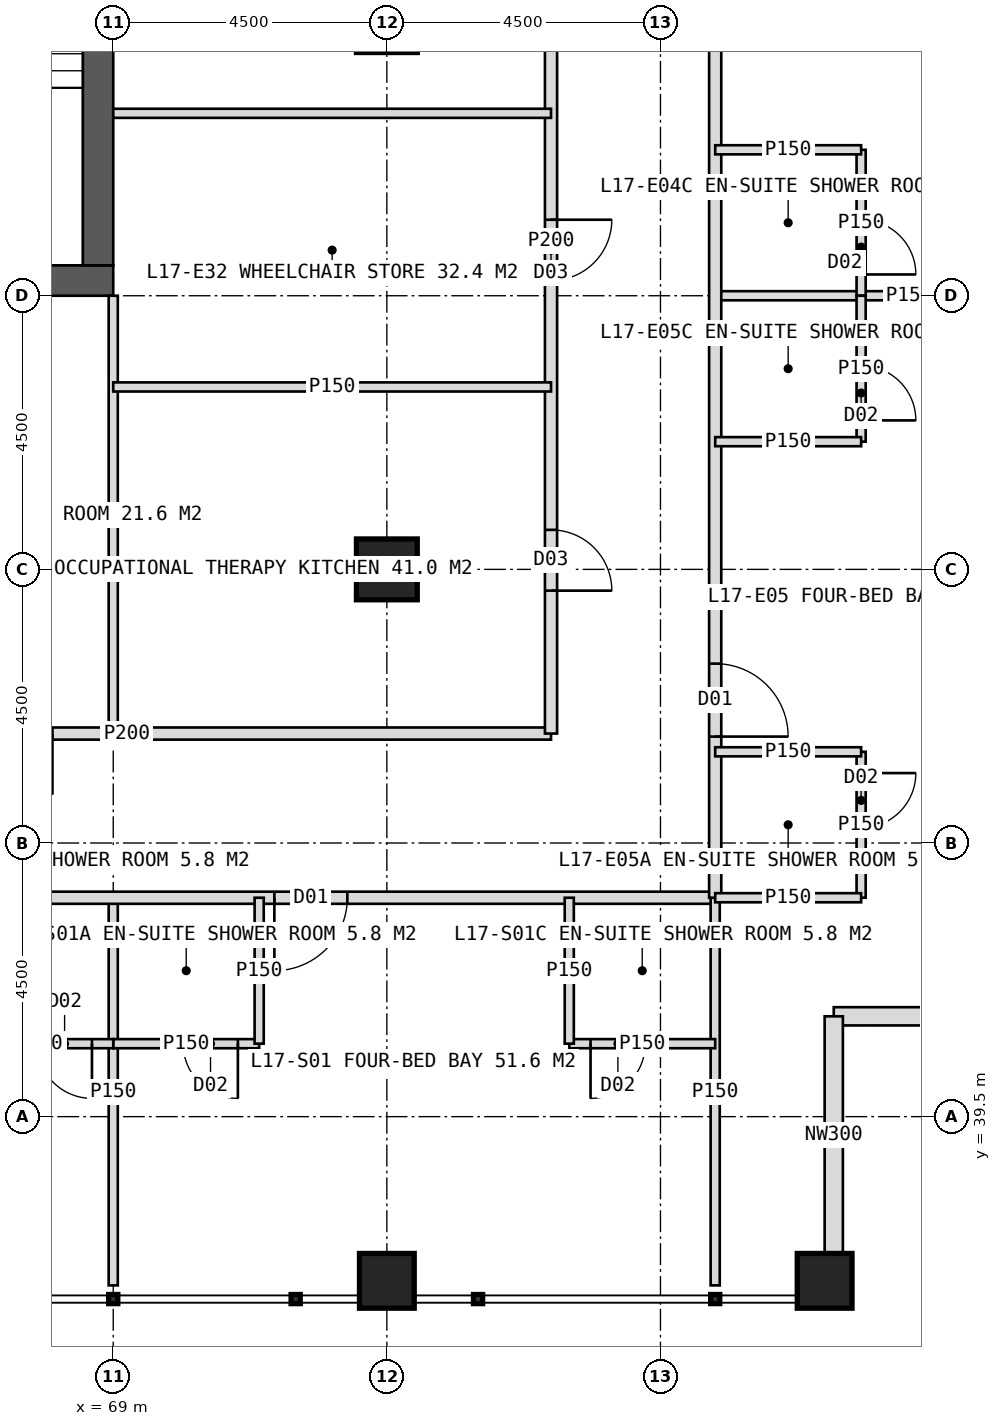
"""IFC4 building model, lengths in metres.
Left out: names, types, materials, properties, quantities, classifications, styles, units other than length and angle.
Written with IfcOpenShell. Run it as: python <this file> out.ifc"""

import sys

from ifc_helpers import new_model, si_unit, direction, frame, frame_2d, origin, origin_2d, place, context, subcontext, project, spatial, rectangle, hollow_rectangle, extrude, element, fill, save


model = new_model("IFC4")
c1 = context("Model", 3, precision=1e-05, world=origin(), true_north=direction((0.0, 1.0)))
c2 = subcontext(c1, "Body", "Model", "MODEL_VIEW")
j1 = project(units=[si_unit("LENGTHUNIT", "METRE"), si_unit("PLANEANGLEUNIT", "RADIAN")], contexts=[c1])
p1 = place(None, origin())
s1 = spatial("IfcSite", under=j1, at=p1, CompositionType="ELEMENT")
p2 = place(p1, origin())
s2 = spatial("IfcBuilding", under=s1, at=p2, CompositionType="ELEMENT")
p3 = place(p2, frame((0.0, 0.0, 75.0)))
s3 = spatial("IfcBuildingStorey", under=s2, at=p3, CompositionType="ELEMENT", Elevation=75.0)
p4 = place(p3, frame((51.0, 53.25, 0.0), z_axis=(0.0, 0.0, 1.0), x_axis=(1.0, 0.0, 0.0)))
e1 = element("IfcWall", 1, at=p4, inside=s3, PredefinedType="SHEAR", context=c2, shape_type="SweptSolid", body=[
    extrude(rectangle(XDim=18.0, YDim=0.5, at=frame_2d((9.0, 0.0))), origin(), (0.0, 0.0, 1.0), 4.0),
])
p5 = place(p4, frame((8.1, 0.0, 0.0)))
e2 = element("IfcOpeningElement", 2, at=p5, cuts=e1, PredefinedType="OPENING", context=c2, shape_type="SweptSolid", body=[
    extrude(rectangle(XDim=1.8, YDim=2.2, at=frame_2d((0.9, 1.1))), frame((0.0, 0.26, 0.0), z_axis=(0.0, -1.0, 0.0), x_axis=(1.0, 0.0, 0.0)), (0.0, 0.0, 1.0), 0.52),
])
p6 = place(p3, frame((68.75, 53.5, 0.0), z_axis=(0.0, 0.0, 1.0), x_axis=(0.0, 1.0, 0.0)))
e3 = element("IfcWall", 3, at=p6, inside=s3, PredefinedType="SHEAR", context=c2, shape_type="SweptSolid", body=[
    extrude(rectangle(XDim=17.0, YDim=0.5, at=frame_2d((8.5, 0.0))), origin(), (0.0, 0.0, 1.0), 4.0),
])
p7 = place(p6, frame((9.5, 0.0, 0.0)))
e4 = element("IfcOpeningElement", 4, at=p7, cuts=e3, PredefinedType="OPENING", context=c2, shape_type="SweptSolid", body=[
    extrude(rectangle(XDim=1.5, YDim=2.2, at=frame_2d((0.75, 1.1))), frame((0.0, 0.26, 0.0), z_axis=(0.0, -1.0, 0.0), x_axis=(1.0, 0.0, 0.0)), (0.0, 0.0, 1.0), 0.52),
])
p8 = place(p3, frame((73.5, 48.5, 0.0), z_axis=(0.0, 0.0, 1.0), x_axis=(1.0, 0.0, 0.0)))
e5 = element("IfcColumn", 5, at=p8, inside=s3, PredefinedType="COLUMN", context=c2, shape_type="SweptSolid", body=[
    extrude(hollow_rectangle(XDim=1.0, YDim=1.0, WallThickness=0.1, at=origin_2d()), origin(), (0.0, 0.0, 1.0), 4.0),
])
for number, where, z_axis, x_axis in (
    (6, (73.5, 36.8, 0.0), (0.0, 0.0, 1.0), (1.0, 0.0, 0.0)),
    (7, (80.7, 36.8, 0.0), (0.0, 0.0, 1.0), (1.0, 0.0, 0.0)),
):
    element("IfcColumn", number, at=place(p3, frame(where, z_axis=z_axis, x_axis=x_axis)), inside=s3, PredefinedType="COLUMN", context=c2, shape_type="SweptSolid", body=[
        extrude(hollow_rectangle(XDim=0.9, YDim=0.9, WallThickness=0.08, at=origin_2d()), origin(), (0.0, 0.0, 1.0), 4.0),
    ])
for number, where, z_axis, x_axis in (
    (8, (84.75, 41.15, 0.0), (0.0, 0.0, 1.0), (-1.0, 0.0, 0.0)),
    (9, (80.85, 41.15, 0.0), (0.0, 0.0, 1.0), (0.0, -1.0, 0.0)),
):
    element("IfcWall", number, at=place(p3, frame(where, z_axis=z_axis, x_axis=x_axis)), inside=s3, PredefinedType="ELEMENTEDWALL", context=c2, shape_type="SweptSolid", body=[
        extrude(rectangle(XDim=3.9, YDim=0.3, at=frame_2d((1.95, 0.0))), origin(), (0.0, 0.0, 1.0), 2.95),
    ])
p9 = place(p3, frame((69.0, 43.1, 0.0), z_axis=(0.0, 0.0, 1.0), x_axis=(0.0, -1.0, 0.0)))
e10 = element("IfcWall", 10, at=p9, inside=s3, PredefinedType="PARTITIONING", context=c2, shape_type="SweptSolid", body=[
    extrude(rectangle(XDim=6.375, YDim=0.15, at=frame_2d((3.188, 0.0))), origin(), (0.0, 0.0, 1.0), 3.75),
])
p10 = place(p3, frame((78.9, 43.1, 0.0), z_axis=(0.0, 0.0, 1.0), x_axis=(-1.0, 0.0, 0.0)))
e11 = element("IfcWall", 11, at=p10, inside=s3, PredefinedType="PARTITIONING", context=c2, shape_type="SweptSolid", body=[
    extrude(rectangle(XDim=37.8, YDim=0.2, at=frame_2d((18.9, 0.0))), origin(), (0.0, 0.0, 1.0), 3.75),
])
p11 = place(p10, frame((6.05, 0.0, 0.0)))
e12 = element("IfcOpeningElement", 12, at=p11, cuts=e11, PredefinedType="OPENING", context=c2, shape_type="SweptSolid", body=[
    extrude(rectangle(XDim=1.2, YDim=2.2, at=frame_2d((0.6, 1.1))), frame((0.0, 0.11, 0.0), z_axis=(0.0, -1.0, 0.0), x_axis=(1.0, 0.0, 0.0)), (0.0, 0.0, 1.0), 0.22),
])
p12 = place(p10, frame((12.55, 0.0, 0.0)))
e13 = element("IfcOpeningElement", 13, at=p12, cuts=e11, PredefinedType="OPENING", context=c2, shape_type="SweptSolid", body=[
    extrude(rectangle(XDim=1.2, YDim=2.2, at=frame_2d((0.6, 1.1))), frame((0.0, 0.11, 0.0), z_axis=(0.0, -1.0, 0.0), x_axis=(1.0, 0.0, 0.0)), (0.0, 0.0, 1.0), 0.22),
])
p13 = place(p10, frame((21.05, 0.0, 0.0)))
e14 = element("IfcOpeningElement", 14, at=p13, cuts=e11, PredefinedType="OPENING", context=c2, shape_type="SweptSolid", body=[
    extrude(rectangle(XDim=1.2, YDim=2.2, at=frame_2d((0.6, 1.1))), frame((0.0, 0.11, 0.0), z_axis=(0.0, -1.0, 0.0), x_axis=(1.0, 0.0, 0.0)), (0.0, 0.0, 1.0), 0.22),
])
p14 = place(p10, frame((27.55, 0.0, 0.0)))
e15 = element("IfcOpeningElement", 15, at=p14, cuts=e11, PredefinedType="OPENING", context=c2, shape_type="SweptSolid", body=[
    extrude(rectangle(XDim=1.2, YDim=2.2, at=frame_2d((0.6, 1.1))), frame((0.0, 0.11, 0.0), z_axis=(0.0, -1.0, 0.0), x_axis=(1.0, 0.0, 0.0)), (0.0, 0.0, 1.0), 0.22),
])
p15 = place(p3, frame((78.9, 43.1, 0.0), z_axis=(0.0, 0.0, 1.0), x_axis=(0.0, -1.0, 0.0)))
e16 = element("IfcWall", 16, at=p15, inside=s3, PredefinedType="PARTITIONING", context=c2, shape_type="SweptSolid", body=[
    extrude(rectangle(XDim=6.375, YDim=0.15, at=frame_2d((3.188, 0.0))), origin(), (0.0, 0.0, 1.0), 3.75),
])
p16 = place(p3, frame((71.4, 40.7, 0.0), z_axis=(0.0, 0.0, 1.0), x_axis=(-1.0, 0.0, 0.0)))
e17 = element("IfcWall", 17, at=p16, inside=s3, PredefinedType="PARTITIONING", context=c2, shape_type="SweptSolid", body=[
    extrude(rectangle(XDim=2.4, YDim=0.15, at=frame_2d((1.2, 0.0))), origin(), (0.0, 0.0, 1.0), 3.75),
])
p17 = place(p16, frame((0.35, 0.0, 0.0)))
e18 = element("IfcOpeningElement", 18, at=p17, cuts=e17, PredefinedType="OPENING", context=c2, shape_type="SweptSolid", body=[
    extrude(rectangle(XDim=0.9, YDim=2.1, at=frame_2d((0.45, 1.05))), frame((0.0, 0.085, 0.0), z_axis=(0.0, -1.0, 0.0), x_axis=(1.0, 0.0, 0.0)), (0.0, 0.0, 1.0), 0.17),
])
p18 = place(p3, frame((71.4, 43.1, 0.0), z_axis=(0.0, 0.0, 1.0), x_axis=(0.0, -1.0, 0.0)))
e19 = element("IfcWall", 19, at=p18, inside=s3, PredefinedType="PARTITIONING", context=c2, shape_type="SweptSolid", body=[
    extrude(rectangle(XDim=2.4, YDim=0.15, at=frame_2d((1.2, 0.0))), origin(), (0.0, 0.0, 1.0), 3.75),
])
p19 = place(p3, frame((78.9, 40.7, 0.0), z_axis=(0.0, 0.0, 1.0), x_axis=(-1.0, 0.0, 0.0)))
e20 = element("IfcWall", 20, at=p19, inside=s3, PredefinedType="PARTITIONING", context=c2, shape_type="SweptSolid", body=[
    extrude(rectangle(XDim=2.4, YDim=0.15, at=frame_2d((1.2, 0.0))), origin(), (0.0, 0.0, 1.0), 3.75),
])
p20 = place(p19, frame((1.15, 0.0, 0.0)))
e21 = element("IfcOpeningElement", 21, at=p20, cuts=e20, PredefinedType="OPENING", context=c2, shape_type="SweptSolid", body=[
    extrude(rectangle(XDim=0.9, YDim=2.1, at=frame_2d((0.45, 1.05))), frame((0.0, 0.085, 0.0), z_axis=(0.0, -1.0, 0.0), x_axis=(1.0, 0.0, 0.0)), (0.0, 0.0, 1.0), 0.17),
])
p21 = place(p3, frame((76.5, 43.1, 0.0), z_axis=(0.0, 0.0, 1.0), x_axis=(0.0, -1.0, 0.0)))
e22 = element("IfcWall", 22, at=p21, inside=s3, PredefinedType="PARTITIONING", context=c2, shape_type="SweptSolid", body=[
    extrude(rectangle(XDim=2.4, YDim=0.15, at=frame_2d((1.2, 0.0))), origin(), (0.0, 0.0, 1.0), 3.75),
])
p22 = place(p3, frame((69.0, 40.7, 0.0), z_axis=(0.0, 0.0, 1.0), x_axis=(-1.0, 0.0, 0.0)))
e23 = element("IfcWall", 23, at=p22, inside=s3, PredefinedType="PARTITIONING", context=c2, shape_type="SweptSolid", body=[
    extrude(rectangle(XDim=2.4, YDim=0.15, at=frame_2d((1.2, 0.0))), origin(), (0.0, 0.0, 1.0), 3.75),
])
p23 = place(p22, frame((0.35, 0.0, 0.0)))
e24 = element("IfcOpeningElement", 24, at=p23, cuts=e23, PredefinedType="OPENING", context=c2, shape_type="SweptSolid", body=[
    extrude(rectangle(XDim=0.9, YDim=2.1, at=frame_2d((0.45, 1.05))), frame((0.0, 0.085, 0.0), z_axis=(0.0, -1.0, 0.0), x_axis=(1.0, 0.0, 0.0)), (0.0, 0.0, 1.0), 0.17),
])
p24 = place(p3, frame((69.0, 53.0, 0.0), z_axis=(0.0, 0.0, 1.0), x_axis=(0.0, -1.0, 0.0)))
e25 = element("IfcWall", 25, at=p24, inside=s3, PredefinedType="PARTITIONING", context=c2, shape_type="SweptSolid", body=[
    extrude(rectangle(XDim=7.2, YDim=0.15, at=frame_2d((3.6, 0.0))), origin(), (0.0, 0.0, 1.0), 3.75),
])
p25 = place(p3, frame((76.2, 45.8, 0.0), z_axis=(0.0, 0.0, 1.0), x_axis=(-1.0, 0.0, 0.0)))
e26 = element("IfcWall", 26, at=p25, inside=s3, PredefinedType="PARTITIONING", context=c2, shape_type="SweptSolid", body=[
    extrude(rectangle(XDim=13.95, YDim=0.2, at=frame_2d((6.975, 0.0))), origin(), (0.0, 0.0, 1.0), 3.75),
])
p26 = place(p25, frame((8.2, 0.0, 0.0)))
e27 = element("IfcOpeningElement", 27, at=p26, cuts=e26, PredefinedType="OPENING", context=c2, shape_type="SweptSolid", body=[
    extrude(rectangle(XDim=1.0, YDim=2.1, at=frame_2d((0.5, 1.05))), frame((0.0, 0.11, 0.0), z_axis=(0.0, -1.0, 0.0), x_axis=(1.0, 0.0, 0.0)), (0.0, 0.0, 1.0), 0.22),
])
p27 = place(p25, frame((11.575, 0.0, 0.0)))
e28 = element("IfcOpeningElement", 28, at=p27, cuts=e26, PredefinedType="OPENING", context=c2, shape_type="SweptSolid", body=[
    extrude(rectangle(XDim=1.0, YDim=2.1, at=frame_2d((0.5, 1.05))), frame((0.0, 0.11, 0.0), z_axis=(0.0, -1.0, 0.0), x_axis=(1.0, 0.0, 0.0)), (0.0, 0.0, 1.0), 0.22),
])
p28 = place(p3, frame((78.9, 53.0, 0.0), z_axis=(0.0, 0.0, 1.0), x_axis=(1.0, 0.0, 0.0)))
e29 = element("IfcWall", 29, at=p28, inside=s3, PredefinedType="PARTITIONING", context=c2, shape_type="SweptSolid", body=[
    extrude(rectangle(XDim=6.375, YDim=0.15, at=frame_2d((3.188, 0.0))), origin(), (0.0, 0.0, 1.0), 3.75),
])
p29 = place(p3, frame((78.9, 80.9, 0.0), z_axis=(0.0, 0.0, 1.0), x_axis=(0.0, -1.0, 0.0)))
e30 = element("IfcWall", 30, at=p29, inside=s3, PredefinedType="PARTITIONING", context=c2, shape_type="SweptSolid", body=[
    extrude(rectangle(XDim=37.8, YDim=0.2, at=frame_2d((18.9, 0.0))), origin(), (0.0, 0.0, 1.0), 3.75),
])
p30 = place(p29, frame((2.45, 0.0, 0.0)))
e31 = element("IfcOpeningElement", 31, at=p30, cuts=e30, PredefinedType="OPENING", context=c2, shape_type="SweptSolid", body=[
    extrude(rectangle(XDim=1.2, YDim=2.2, at=frame_2d((0.6, 1.1))), frame((0.0, 0.11, 0.0), z_axis=(0.0, -1.0, 0.0), x_axis=(1.0, 0.0, 0.0)), (0.0, 0.0, 1.0), 0.22),
])
p31 = place(p29, frame((9.55, 0.0, 0.0)))
e32 = element("IfcOpeningElement", 32, at=p31, cuts=e30, PredefinedType="OPENING", context=c2, shape_type="SweptSolid", body=[
    extrude(rectangle(XDim=1.2, YDim=2.2, at=frame_2d((0.6, 1.1))), frame((0.0, 0.11, 0.0), z_axis=(0.0, -1.0, 0.0), x_axis=(1.0, 0.0, 0.0)), (0.0, 0.0, 1.0), 0.22),
])
p32 = place(p29, frame((15.05, 0.0, 0.0)))
e33 = element("IfcOpeningElement", 33, at=p32, cuts=e30, PredefinedType="OPENING", context=c2, shape_type="SweptSolid", body=[
    extrude(rectangle(XDim=1.2, YDim=2.2, at=frame_2d((0.6, 1.1))), frame((0.0, 0.11, 0.0), z_axis=(0.0, -1.0, 0.0), x_axis=(1.0, 0.0, 0.0)), (0.0, 0.0, 1.0), 0.22),
])
p33 = place(p29, frame((21.55, 0.0, 0.0)))
e34 = element("IfcOpeningElement", 34, at=p33, cuts=e30, PredefinedType="OPENING", context=c2, shape_type="SweptSolid", body=[
    extrude(rectangle(XDim=1.2, YDim=2.2, at=frame_2d((0.6, 1.1))), frame((0.0, 0.11, 0.0), z_axis=(0.0, -1.0, 0.0), x_axis=(1.0, 0.0, 0.0)), (0.0, 0.0, 1.0), 0.22),
])
p34 = place(p29, frame((33.95, 0.0, 0.0)))
e35 = element("IfcOpeningElement", 35, at=p34, cuts=e30, PredefinedType="OPENING", context=c2, shape_type="SweptSolid", body=[
    extrude(rectangle(XDim=1.2, YDim=2.2, at=frame_2d((0.6, 1.1))), frame((0.0, 0.11, 0.0), z_axis=(0.0, -1.0, 0.0), x_axis=(1.0, 0.0, 0.0)), (0.0, 0.0, 1.0), 0.22),
])
p35 = place(p3, frame((81.3, 55.4, 0.0), z_axis=(0.0, 0.0, 1.0), x_axis=(0.0, -1.0, 0.0)))
e36 = element("IfcWall", 36, at=p35, inside=s3, PredefinedType="PARTITIONING", context=c2, shape_type="SweptSolid", body=[
    extrude(rectangle(XDim=2.4, YDim=0.15, at=frame_2d((1.2, 0.0))), origin(), (0.0, 0.0, 1.0), 3.75),
])
p36 = place(p35, frame((1.15, 0.0, 0.0)))
e37 = element("IfcOpeningElement", 37, at=p36, cuts=e36, PredefinedType="OPENING", context=c2, shape_type="SweptSolid", body=[
    extrude(rectangle(XDim=0.9, YDim=2.1, at=frame_2d((0.45, 1.05))), frame((0.0, 0.085, 0.0), z_axis=(0.0, -1.0, 0.0), x_axis=(1.0, 0.0, 0.0)), (0.0, 0.0, 1.0), 0.17),
])
p37 = place(p3, frame((78.9, 55.4, 0.0), z_axis=(0.0, 0.0, 1.0), x_axis=(1.0, 0.0, 0.0)))
e38 = element("IfcWall", 38, at=p37, inside=s3, PredefinedType="PARTITIONING", context=c2, shape_type="SweptSolid", body=[
    extrude(rectangle(XDim=2.4, YDim=0.15, at=frame_2d((1.2, 0.0))), origin(), (0.0, 0.0, 1.0), 3.75),
])
p38 = place(p3, frame((81.3, 45.5, 0.0), z_axis=(0.0, 0.0, 1.0), x_axis=(0.0, -1.0, 0.0)))
e39 = element("IfcWall", 39, at=p38, inside=s3, PredefinedType="PARTITIONING", context=c2, shape_type="SweptSolid", body=[
    extrude(rectangle(XDim=2.4, YDim=0.15, at=frame_2d((1.2, 0.0))), origin(), (0.0, 0.0, 1.0), 3.75),
])
p39 = place(p38, frame((0.35, 0.0, 0.0)))
e40 = element("IfcOpeningElement", 40, at=p39, cuts=e39, PredefinedType="OPENING", context=c2, shape_type="SweptSolid", body=[
    extrude(rectangle(XDim=0.9, YDim=2.1, at=frame_2d((0.45, 1.05))), frame((0.0, 0.085, 0.0), z_axis=(0.0, -1.0, 0.0), x_axis=(1.0, 0.0, 0.0)), (0.0, 0.0, 1.0), 0.17),
])
p40 = place(p3, frame((78.9, 45.5, 0.0), z_axis=(0.0, 0.0, 1.0), x_axis=(1.0, 0.0, 0.0)))
e41 = element("IfcWall", 41, at=p40, inside=s3, PredefinedType="PARTITIONING", context=c2, shape_type="SweptSolid", body=[
    extrude(rectangle(XDim=2.4, YDim=0.15, at=frame_2d((1.2, 0.0))), origin(), (0.0, 0.0, 1.0), 3.75),
])
p41 = place(p3, frame((81.3, 53.0, 0.0), z_axis=(0.0, 0.0, 1.0), x_axis=(0.0, -1.0, 0.0)))
e42 = element("IfcWall", 42, at=p41, inside=s3, PredefinedType="PARTITIONING", context=c2, shape_type="SweptSolid", body=[
    extrude(rectangle(XDim=2.4, YDim=0.15, at=frame_2d((1.2, 0.0))), origin(), (0.0, 0.0, 1.0), 3.75),
])
p42 = place(p41, frame((1.15, 0.0, 0.0)))
e43 = element("IfcOpeningElement", 43, at=p42, cuts=e42, PredefinedType="OPENING", context=c2, shape_type="SweptSolid", body=[
    extrude(rectangle(XDim=0.9, YDim=2.1, at=frame_2d((0.45, 1.05))), frame((0.0, 0.085, 0.0), z_axis=(0.0, -1.0, 0.0), x_axis=(1.0, 0.0, 0.0)), (0.0, 0.0, 1.0), 0.17),
])
for number, where, z_axis, x_axis in (
    (44, (78.9, 50.6, 0.0), (0.0, 0.0, 1.0), (1.0, 0.0, 0.0)),
    (45, (78.9, 43.1, 0.0), (0.0, 0.0, 1.0), (1.0, 0.0, 0.0)),
):
    element("IfcWall", number, at=place(p3, frame(where, z_axis=z_axis, x_axis=x_axis)), inside=s3, PredefinedType="PARTITIONING", context=c2, shape_type="SweptSolid", body=[
        extrude(rectangle(XDim=2.4, YDim=0.15, at=frame_2d((1.2, 0.0))), origin(), (0.0, 0.0, 1.0), 3.75),
    ])
p43 = place(p3, frame((76.2, 62.0, 0.0), z_axis=(0.0, 0.0, 1.0), x_axis=(0.0, -1.0, 0.0)))
e46 = element("IfcWall", 46, at=p43, inside=s3, PredefinedType="PARTITIONING", context=c2, shape_type="SweptSolid", body=[
    extrude(rectangle(XDim=16.2, YDim=0.2, at=frame_2d((8.1, 0.0))), origin(), (0.0, 0.0, 1.0), 3.75),
])
p44 = place(p43, frame((2.5, 0.0, 0.0)))
e47 = element("IfcOpeningElement", 47, at=p44, cuts=e46, PredefinedType="OPENING", context=c2, shape_type="SweptSolid", body=[
    extrude(rectangle(XDim=1.0, YDim=2.1, at=frame_2d((0.5, 1.05))), frame((0.0, 0.11, 0.0), z_axis=(0.0, -1.0, 0.0), x_axis=(1.0, 0.0, 0.0)), (0.0, 0.0, 1.0), 0.22),
])
p45 = place(p43, frame((7.75, 0.0, 0.0)))
e48 = element("IfcOpeningElement", 48, at=p45, cuts=e46, PredefinedType="OPENING", context=c2, shape_type="SweptSolid", body=[
    extrude(rectangle(XDim=1.0, YDim=2.1, at=frame_2d((0.5, 1.05))), frame((0.0, 0.11, 0.0), z_axis=(0.0, -1.0, 0.0), x_axis=(1.0, 0.0, 0.0)), (0.0, 0.0, 1.0), 0.22),
])
p46 = place(p43, frame((12.85, 0.0, 0.0)))
e49 = element("IfcOpeningElement", 49, at=p46, cuts=e46, PredefinedType="OPENING", context=c2, shape_type="SweptSolid", body=[
    extrude(rectangle(XDim=1.0, YDim=2.1, at=frame_2d((0.5, 1.05))), frame((0.0, 0.11, 0.0), z_axis=(0.0, -1.0, 0.0), x_axis=(1.0, 0.0, 0.0)), (0.0, 0.0, 1.0), 0.22),
])
for number, where, z_axis, x_axis in (
    (50, (69.0, 56.0, 0.0), (0.0, 0.0, 1.0), (1.0, 0.0, 0.0)),
    (51, (69.0, 51.5, 0.0), (0.0, 0.0, 1.0), (1.0, 0.0, 0.0)),
):
    element("IfcWall", number, at=place(p3, frame(where, z_axis=z_axis, x_axis=x_axis)), inside=s3, PredefinedType="PARTITIONING", context=c2, shape_type="SweptSolid", body=[
        extrude(rectangle(XDim=7.2, YDim=0.15, at=frame_2d((3.6, 0.0))), origin(), (0.0, 0.0, 1.0), 3.75),
    ])
p47 = place(p11, origin())
e52 = element("IfcDoor", 52, at=p47, inside=s3, OperationType="SINGLE_SWING_RIGHT", PredefinedType="DOOR", context=c2, shape_type="SweptSolid", body=[
    extrude(rectangle(XDim=1.2, YDim=2.2, at=frame_2d((0.6, 1.1))), frame((0.0, 0.025, 0.0), z_axis=(0.0, -1.0, 0.0), x_axis=(1.0, 0.0, 0.0)), (0.0, 0.0, 1.0), 0.05),
])
fill(e12, e52)
p48 = place(p17, origin())
e53 = element("IfcDoor", 53, at=p48, inside=s3, OperationType="SINGLE_SWING_LEFT", PredefinedType="DOOR", context=c2, shape_type="SweptSolid", body=[
    extrude(rectangle(XDim=0.9, YDim=2.1, at=frame_2d((0.45, 1.05))), frame((0.0, 0.025, 0.0), z_axis=(0.0, -1.0, 0.0), x_axis=(1.0, 0.0, 0.0)), (0.0, 0.0, 1.0), 0.05),
])
fill(e18, e53)
p49 = place(p20, origin())
e54 = element("IfcDoor", 54, at=p49, inside=s3, OperationType="SINGLE_SWING_RIGHT", PredefinedType="DOOR", context=c2, shape_type="SweptSolid", body=[
    extrude(rectangle(XDim=0.9, YDim=2.1, at=frame_2d((0.45, 1.05))), frame((0.0, 0.025, 0.0), z_axis=(0.0, -1.0, 0.0), x_axis=(1.0, 0.0, 0.0)), (0.0, 0.0, 1.0), 0.05),
])
fill(e21, e54)
p50 = place(p23, origin())
e55 = element("IfcDoor", 55, at=p50, inside=s3, OperationType="SINGLE_SWING_LEFT", PredefinedType="DOOR", context=c2, shape_type="SweptSolid", body=[
    extrude(rectangle(XDim=0.9, YDim=2.1, at=frame_2d((0.45, 1.05))), frame((0.0, 0.025, 0.0), z_axis=(0.0, -1.0, 0.0), x_axis=(1.0, 0.0, 0.0)), (0.0, 0.0, 1.0), 0.05),
])
fill(e24, e55)
p51 = place(p36, origin())
e56 = element("IfcDoor", 56, at=p51, inside=s3, OperationType="SINGLE_SWING_RIGHT", PredefinedType="DOOR", context=c2, shape_type="SweptSolid", body=[
    extrude(rectangle(XDim=0.9, YDim=2.1, at=frame_2d((0.45, 1.05))), frame((0.0, 0.025, 0.0), z_axis=(0.0, -1.0, 0.0), x_axis=(1.0, 0.0, 0.0)), (0.0, 0.0, 1.0), 0.05),
])
fill(e37, e56)
p52 = place(p34, origin())
e57 = element("IfcDoor", 57, at=p52, inside=s3, OperationType="SINGLE_SWING_RIGHT", PredefinedType="DOOR", context=c2, shape_type="SweptSolid", body=[
    extrude(rectangle(XDim=1.2, YDim=2.2, at=frame_2d((0.6, 1.1))), frame((0.0, 0.025, 0.0), z_axis=(0.0, -1.0, 0.0), x_axis=(1.0, 0.0, 0.0)), (0.0, 0.0, 1.0), 0.05),
])
fill(e35, e57)
p53 = place(p39, origin())
e58 = element("IfcDoor", 58, at=p53, inside=s3, OperationType="SINGLE_SWING_LEFT", PredefinedType="DOOR", context=c2, shape_type="SweptSolid", body=[
    extrude(rectangle(XDim=0.9, YDim=2.1, at=frame_2d((0.45, 1.05))), frame((0.0, 0.025, 0.0), z_axis=(0.0, -1.0, 0.0), x_axis=(1.0, 0.0, 0.0)), (0.0, 0.0, 1.0), 0.05),
])
fill(e40, e58)
p54 = place(p42, origin())
e59 = element("IfcDoor", 59, at=p54, inside=s3, OperationType="SINGLE_SWING_RIGHT", PredefinedType="DOOR", context=c2, shape_type="SweptSolid", body=[
    extrude(rectangle(XDim=0.9, YDim=2.1, at=frame_2d((0.45, 1.05))), frame((0.0, 0.025, 0.0), z_axis=(0.0, -1.0, 0.0), x_axis=(1.0, 0.0, 0.0)), (0.0, 0.0, 1.0), 0.05),
])
fill(e43, e59)
p55 = place(p45, origin())
e60 = element("IfcDoor", 60, at=p55, inside=s3, OperationType="SINGLE_SWING_LEFT", PredefinedType="DOOR", context=c2, shape_type="SweptSolid", body=[
    extrude(rectangle(XDim=1.0, YDim=2.1, at=frame_2d((0.5, 1.05))), frame((0.0, 0.025, 0.0), z_axis=(0.0, -1.0, 0.0), x_axis=(1.0, 0.0, 0.0)), (0.0, 0.0, 1.0), 0.05),
])
fill(e48, e60)
p56 = place(p46, origin())
e61 = element("IfcDoor", 61, at=p56, inside=s3, OperationType="SINGLE_SWING_RIGHT", PredefinedType="DOOR", context=c2, shape_type="SweptSolid", body=[
    extrude(rectangle(XDim=1.0, YDim=2.1, at=frame_2d((0.5, 1.05))), frame((0.0, 0.025, 0.0), z_axis=(0.0, -1.0, 0.0), x_axis=(1.0, 0.0, 0.0)), (0.0, 0.0, 1.0), 0.05),
])
fill(e49, e61)
save(model, sys.argv[1])
